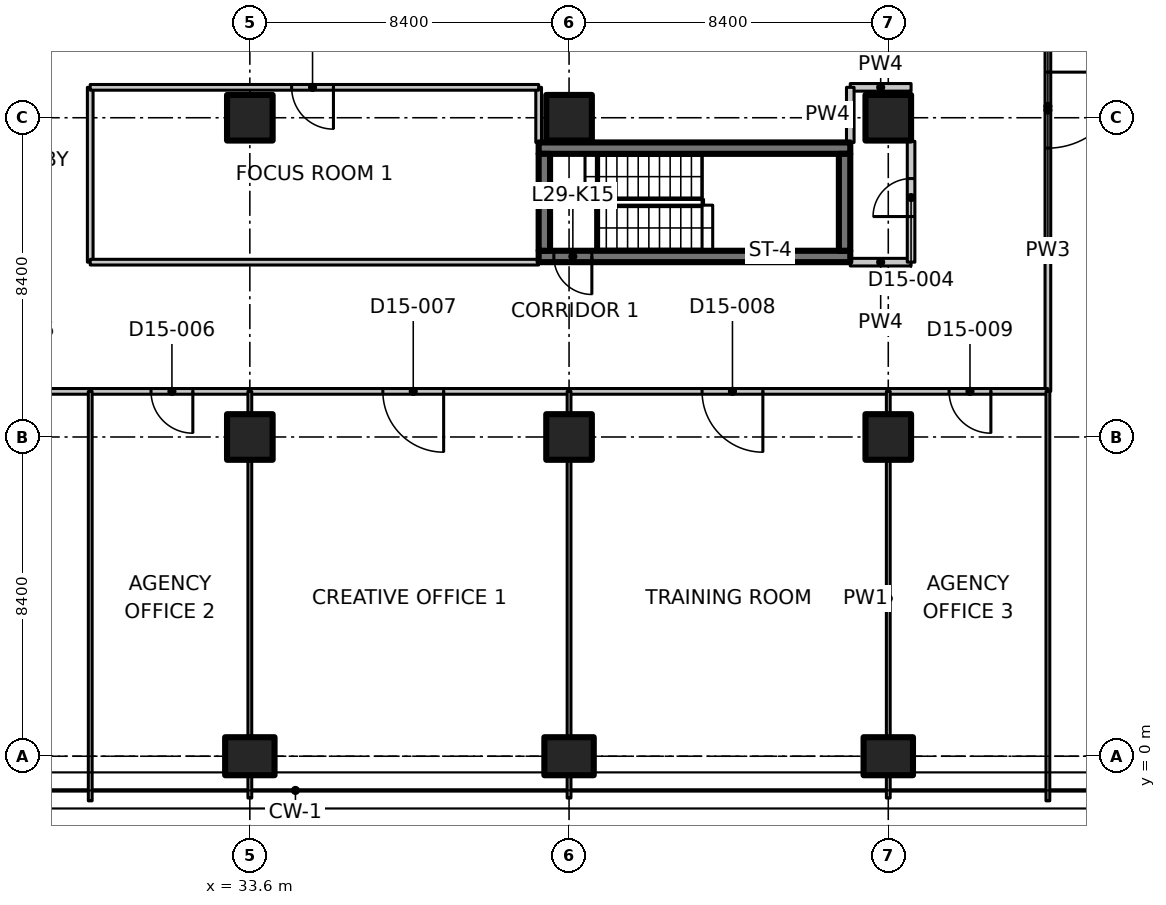
"""IFC4 building model, lengths in metres.
Left out: names, types, materials, properties, quantities, classifications, styles, units other than length and angle.
Written with IfcOpenShell. Run it as: python <this file> out.ifc"""

import sys

from ifc_helpers import new_model, si_unit, direction, frame, frame_2d, origin, origin_2d, place, context, subcontext, project, spatial, polyline, rectangle, outline, extrude, element, fill, save


model = new_model("IFC4")
c1 = context("Model", 3, precision=1e-05, world=origin(), true_north=direction((0.0, 1.0)))
c2 = subcontext(c1, "Body", "Model", "MODEL_VIEW")
j1 = project(units=[si_unit("LENGTHUNIT", "METRE"), si_unit("PLANEANGLEUNIT", "RADIAN")], contexts=[c1])
p1 = place(None, origin())
s1 = spatial("IfcSite", under=j1, at=p1, CompositionType="ELEMENT")
p2 = place(p1, origin())
s2 = spatial("IfcBuilding", under=s1, at=p2, CompositionType="ELEMENT")
p3 = place(p2, frame((0.0, 0.0, 120.5)))
s3 = spatial("IfcBuildingStorey", under=s2, at=p3, CompositionType="ELEMENT", Elevation=120.5)
p4 = place(p3, frame((33.6, 0.0, 0.0), z_axis=(0.0, 0.0, 1.0), x_axis=(0.0, 1.0, 0.0)))
e1 = element("IfcColumn", 1, at=p4, inside=s3, PredefinedType="COLUMN", context=c2, shape_type="SweptSolid", body=[
    extrude(rectangle(XDim=1.0, YDim=1.3, at=origin_2d()), origin(), (0.0, 0.0, 1.0), 3.35),
])
for number, where, z_axis, x_axis in (
    (2, (33.6, 8.4, 0.0), (0.0, 0.0, 1.0), (1.0, 0.0, 0.0)),
    (3, (33.6, 16.8, 0.0), (0.0, 0.0, 1.0), (1.0, 0.0, 0.0)),
):
    element("IfcColumn", number, at=place(p3, frame(where, z_axis=z_axis, x_axis=x_axis)), inside=s3, PredefinedType="COLUMN", context=c2, shape_type="SweptSolid", body=[
        extrude(rectangle(XDim=1.2, YDim=1.2, at=origin_2d()), origin(), (0.0, 0.0, 1.0), 3.35),
    ])
p5 = place(p3, frame((42.0, 0.0, 0.0), z_axis=(0.0, 0.0, 1.0), x_axis=(0.0, 1.0, 0.0)))
e4 = element("IfcColumn", 4, at=p5, inside=s3, PredefinedType="COLUMN", context=c2, shape_type="SweptSolid", body=[
    extrude(rectangle(XDim=1.0, YDim=1.3, at=origin_2d()), origin(), (0.0, 0.0, 1.0), 3.35),
])
for number, where, z_axis, x_axis in (
    (5, (42.0, 8.4, 0.0), (0.0, 0.0, 1.0), (1.0, 0.0, 0.0)),
    (6, (42.0, 16.8, 0.0), (0.0, 0.0, 1.0), (1.0, 0.0, 0.0)),
):
    element("IfcColumn", number, at=place(p3, frame(where, z_axis=z_axis, x_axis=x_axis)), inside=s3, PredefinedType="COLUMN", context=c2, shape_type="SweptSolid", body=[
        extrude(rectangle(XDim=1.2, YDim=1.2, at=origin_2d()), origin(), (0.0, 0.0, 1.0), 3.35),
    ])
p6 = place(p3, frame((50.4, 0.0, 0.0), z_axis=(0.0, 0.0, 1.0), x_axis=(0.0, 1.0, 0.0)))
e7 = element("IfcColumn", 7, at=p6, inside=s3, PredefinedType="COLUMN", context=c2, shape_type="SweptSolid", body=[
    extrude(rectangle(XDim=1.0, YDim=1.3, at=origin_2d()), origin(), (0.0, 0.0, 1.0), 3.35),
])
for number, where, z_axis, x_axis in (
    (8, (50.4, 8.4, 0.0), (0.0, 0.0, 1.0), (1.0, 0.0, 0.0)),
    (9, (50.4, 16.8, 0.0), (0.0, 0.0, 1.0), (1.0, 0.0, 0.0)),
):
    element("IfcColumn", number, at=place(p3, frame(where, z_axis=z_axis, x_axis=x_axis)), inside=s3, PredefinedType="COLUMN", context=c2, shape_type="SweptSolid", body=[
        extrude(rectangle(XDim=1.2, YDim=1.2, at=origin_2d()), origin(), (0.0, 0.0, 1.0), 3.35),
    ])
p7 = place(p3, frame((49.4, 13.15, 0.0), z_axis=(0.0, 0.0, 1.0), x_axis=(-1.0, 0.0, 0.0)))
e10 = element("IfcWall", 10, at=p7, inside=s3, PredefinedType="SHEAR", context=c2, shape_type="SweptSolid", body=[
    extrude(rectangle(XDim=8.2, YDim=0.3, at=frame_2d((4.1, 0.0))), origin(), (0.0, 0.0, 1.0), 3.35),
])
p8 = place(p7, frame((6.8, 0.0, 0.0)))
e11 = element("IfcOpeningElement", 11, at=p8, cuts=e10, PredefinedType="OPENING", context=c2, shape_type="SweptSolid", body=[
    extrude(rectangle(XDim=1.0, YDim=2.1, at=frame_2d((0.5, 1.05))), frame((0.0, 0.16, 0.0), z_axis=(0.0, -1.0, 0.0), x_axis=(1.0, 0.0, 0.0)), (0.0, 0.0, 1.0), 0.32),
])
p9 = place(p3, frame((41.2, 16.0, 0.0), z_axis=(0.0, 0.0, 1.0), x_axis=(1.0, 0.0, 0.0)))
e12 = element("IfcWall", 12, at=p9, inside=s3, PredefinedType="SHEAR", context=c2, shape_type="SweptSolid", body=[
    extrude(rectangle(XDim=8.2, YDim=0.3, at=frame_2d((4.1, 0.0))), origin(), (0.0, 0.0, 1.0), 3.35),
])
for number, where, z_axis, x_axis in (
    (13, (41.35, 13.3, 0.0), (0.0, 0.0, 1.0), (0.0, 1.0, 0.0)),
    (14, (49.25, 13.3, 0.0), (0.0, 0.0, 1.0), (0.0, 1.0, 0.0)),
):
    element("IfcWall", number, at=place(p3, frame(where, z_axis=z_axis, x_axis=x_axis)), inside=s3, PredefinedType="SHEAR", context=c2, shape_type="SweptSolid", body=[
        extrude(rectangle(XDim=2.55, YDim=0.3, at=frame_2d((1.275, 0.0))), origin(), (0.0, 0.0, 1.0), 3.35),
    ])
p10 = place(p3, frame((29.4, 17.6, 0.0), z_axis=(0.0, 0.0, 1.0), x_axis=(0.0, -1.0, 0.0)))
e15 = element("IfcWall", 15, at=p10, inside=s3, PredefinedType="PARTITIONING", context=c2, shape_type="SweptSolid", body=[
    extrude(rectangle(XDim=4.6, YDim=0.15, at=frame_2d((2.3, 0.0))), origin(), (0.0, 0.0, 1.0), 3.33),
])
p11 = place(p3, frame((29.4, 9.6, 0.0), z_axis=(0.0, 0.0, 1.0), x_axis=(-1.0, 0.0, 0.0)))
e16 = element("IfcWall", 16, at=p11, inside=s3, PredefinedType="PARTITIONING", context=c2, shape_type="SweptSolid", body=[
    extrude(rectangle(XDim=4.2, YDim=0.15, at=frame_2d((2.1, 0.0))), origin(), (0.0, 0.0, 1.0), 3.33),
])
p12 = place(p11, frame((1.5, 0.0, 0.0)))
e17 = element("IfcOpeningElement", 17, at=p12, cuts=e16, PredefinedType="OPENING", context=c2, shape_type="SweptSolid", body=[
    extrude(rectangle(XDim=1.1, YDim=2.1, at=frame_2d((0.55, 1.05))), frame((0.0, 0.085, 0.0), z_axis=(0.0, -1.0, 0.0), x_axis=(1.0, 0.0, 0.0)), (0.0, 0.0, 1.0), 0.17),
])
p13 = place(p3, frame((54.6, 13.0, 0.0), z_axis=(0.0, 0.0, 1.0), x_axis=(0.0, -1.0, 0.0)))
e18 = element("IfcWall", 18, at=p13, inside=s3, PredefinedType="PARTITIONING", context=c2, shape_type="SweptSolid", body=[
    extrude(rectangle(XDim=3.4, YDim=0.15, at=frame_2d((1.7, 0.0))), origin(), (0.0, 0.0, 1.0), 3.33),
])
p14 = place(p3, frame((29.4, 13.0, 0.0), z_axis=(0.0, 0.0, 1.0), x_axis=(1.0, 0.0, 0.0)))
e19 = element("IfcWall", 19, at=p14, inside=s3, PredefinedType="PARTITIONING", context=c2, shape_type="SweptSolid", body=[
    extrude(rectangle(XDim=11.8, YDim=0.15, at=frame_2d((5.9, 0.0))), origin(), (0.0, 0.0, 1.0), 3.33),
])
p15 = place(p3, frame((49.4, 13.0, 0.0), z_axis=(0.0, 0.0, 1.0), x_axis=(1.0, 0.0, 0.0)))
e20 = element("IfcWall", 20, at=p15, inside=s3, PredefinedType="PARTITIONING", context=c2, shape_type="SweptSolid", body=[
    extrude(rectangle(XDim=1.6, YDim=0.2, at=frame_2d((0.8, 0.0))), origin(), (0.0, 0.0, 1.0), 3.33),
])
p16 = place(p3, frame((33.6, 9.6, 0.0), z_axis=(0.0, 0.0, 1.0), x_axis=(-1.0, 0.0, 0.0)))
e21 = element("IfcWall", 21, at=p16, inside=s3, PredefinedType="PARTITIONING", context=c2, shape_type="SweptSolid", body=[
    extrude(rectangle(XDim=4.2, YDim=0.15, at=frame_2d((2.1, 0.0))), origin(), (0.0, 0.0, 1.0), 3.33),
])
p17 = place(p16, frame((1.5, 0.0, 0.0)))
e22 = element("IfcOpeningElement", 22, at=p17, cuts=e21, PredefinedType="OPENING", context=c2, shape_type="SweptSolid", body=[
    extrude(rectangle(XDim=1.1, YDim=2.1, at=frame_2d((0.55, 1.05))), frame((0.0, 0.085, 0.0), z_axis=(0.0, -1.0, 0.0), x_axis=(1.0, 0.0, 0.0)), (0.0, 0.0, 1.0), 0.17),
])
p18 = place(p3, frame((42.0, 9.6, 0.0), z_axis=(0.0, 0.0, 1.0), x_axis=(-1.0, 0.0, 0.0)))
e23 = element("IfcWall", 23, at=p18, inside=s3, PredefinedType="PARTITIONING", context=c2, shape_type="SweptSolid", body=[
    extrude(rectangle(XDim=8.4, YDim=0.15, at=frame_2d((4.2, 0.0))), origin(), (0.0, 0.0, 1.0), 3.33),
])
p19 = place(p18, frame((3.3, 0.0, 0.0)))
e24 = element("IfcOpeningElement", 24, at=p19, cuts=e23, PredefinedType="OPENING", context=c2, shape_type="SweptSolid", body=[
    extrude(rectangle(XDim=1.6, YDim=2.1, at=frame_2d((0.8, 1.05))), frame((0.0, 0.085, 0.0), z_axis=(0.0, -1.0, 0.0), x_axis=(1.0, 0.0, 0.0)), (0.0, 0.0, 1.0), 0.17),
])
p20 = place(p3, frame((50.4, 9.6, 0.0), z_axis=(0.0, 0.0, 1.0), x_axis=(-1.0, 0.0, 0.0)))
e25 = element("IfcWall", 25, at=p20, inside=s3, PredefinedType="PARTITIONING", context=c2, shape_type="SweptSolid", body=[
    extrude(rectangle(XDim=8.4, YDim=0.15, at=frame_2d((4.2, 0.0))), origin(), (0.0, 0.0, 1.0), 3.33),
])
p21 = place(p20, frame((3.3, 0.0, 0.0)))
e26 = element("IfcOpeningElement", 26, at=p21, cuts=e25, PredefinedType="OPENING", context=c2, shape_type="SweptSolid", body=[
    extrude(rectangle(XDim=1.6, YDim=2.1, at=frame_2d((0.8, 1.05))), frame((0.0, 0.085, 0.0), z_axis=(0.0, -1.0, 0.0), x_axis=(1.0, 0.0, 0.0)), (0.0, 0.0, 1.0), 0.17),
])
p22 = place(p3, frame((54.6, 9.6, 0.0), z_axis=(0.0, 0.0, 1.0), x_axis=(-1.0, 0.0, 0.0)))
e27 = element("IfcWall", 27, at=p22, inside=s3, PredefinedType="PARTITIONING", context=c2, shape_type="SweptSolid", body=[
    extrude(rectangle(XDim=4.2, YDim=0.15, at=frame_2d((2.1, 0.0))), origin(), (0.0, 0.0, 1.0), 3.33),
])
p23 = place(p22, frame((1.5, 0.0, 0.0)))
e28 = element("IfcOpeningElement", 28, at=p23, cuts=e27, PredefinedType="OPENING", context=c2, shape_type="SweptSolid", body=[
    extrude(rectangle(XDim=1.1, YDim=2.1, at=frame_2d((0.55, 1.05))), frame((0.0, 0.085, 0.0), z_axis=(0.0, -1.0, 0.0), x_axis=(1.0, 0.0, 0.0)), (0.0, 0.0, 1.0), 0.17),
])
p24 = place(p3, frame((54.6, 21.2, 0.0), z_axis=(0.0, 0.0, 1.0), x_axis=(0.0, -1.0, 0.0)))
e29 = element("IfcWall", 29, at=p24, inside=s3, PredefinedType="PARTITIONING", context=c2, shape_type="SweptSolid", body=[
    extrude(rectangle(XDim=8.2, YDim=0.15, at=frame_2d((4.1, 0.0))), origin(), (0.0, 0.0, 1.0), 3.33),
])
p25 = place(p24, frame((3.2, 0.0, 0.0)))
e30 = element("IfcOpeningElement", 30, at=p25, cuts=e29, PredefinedType="OPENING", context=c2, shape_type="SweptSolid", body=[
    extrude(rectangle(XDim=2.0, YDim=2.4, at=frame_2d((1.0, 1.2))), frame((0.0, 0.085, 0.0), z_axis=(0.0, -1.0, 0.0), x_axis=(1.0, 0.0, 0.0)), (0.0, 0.0, 1.0), 0.17),
])
p26 = place(p3, frame((54.6, -1.174, 0.0), z_axis=(0.0, 0.0, 1.0), x_axis=(0.0, 1.0, 0.0)))
e31 = element("IfcWall", 31, at=p26, inside=s3, PredefinedType="PARTITIONING", context=c2, shape_type="SweptSolid", body=[
    extrude(outline(polyline([(0.0, 0.0), (10.774, 0.0), (10.774, 3.33), (1.624, 3.33), (1.622, 2.98), (0.726, 2.98), (0.724, 3.33), (0.074, 3.33), (0.0, 3.33), (0.0, 0.0)])), frame((0.0, 0.05, 0.0), z_axis=(0.0, -1.0, 0.0), x_axis=(1.0, 0.0, 0.0)), (0.0, 0.0, 1.0), 0.1),
])
p27 = place(p3, frame((41.2, 16.15, 0.0), z_axis=(0.0, 0.0, 1.0), x_axis=(0.0, 1.0, 0.0)))
e32 = element("IfcWall", 32, at=p27, inside=s3, PredefinedType="PARTITIONING", context=c2, shape_type="SweptSolid", body=[
    extrude(rectangle(XDim=1.45, YDim=0.15, at=frame_2d((0.725, 0.0))), origin(), (0.0, 0.0, 1.0), 3.33),
])
p28 = place(p3, frame((41.2, 17.6, 0.0), z_axis=(0.0, 0.0, 1.0), x_axis=(-1.0, 0.0, 0.0)))
e33 = element("IfcWall", 33, at=p28, inside=s3, PredefinedType="PARTITIONING", context=c2, shape_type="SweptSolid", body=[
    extrude(rectangle(XDim=11.8, YDim=0.15, at=frame_2d((5.9, 0.0))), origin(), (0.0, 0.0, 1.0), 3.33),
])
p29 = place(p28, frame((5.4, 0.0, 0.0)))
e34 = element("IfcOpeningElement", 34, at=p29, cuts=e33, PredefinedType="OPENING", context=c2, shape_type="SweptSolid", body=[
    extrude(rectangle(XDim=1.1, YDim=2.1, at=frame_2d((0.55, 1.05))), frame((0.0, 0.085, 0.0), z_axis=(0.0, -1.0, 0.0), x_axis=(1.0, 0.0, 0.0)), (0.0, 0.0, 1.0), 0.17),
])
p30 = place(p3, frame((51.0, 17.6, 0.0), z_axis=(0.0, 0.0, 1.0), x_axis=(-1.0, 0.0, 0.0)))
e35 = element("IfcWall", 35, at=p30, inside=s3, PredefinedType="PARTITIONING", context=c2, shape_type="SweptSolid", body=[
    extrude(rectangle(XDim=1.6, YDim=0.2, at=frame_2d((0.8, 0.0))), origin(), (0.0, 0.0, 1.0), 3.33),
])
p31 = place(p3, frame((49.4, 17.6, 0.0), z_axis=(0.0, 0.0, 1.0), x_axis=(0.0, -1.0, 0.0)))
e36 = element("IfcWall", 36, at=p31, inside=s3, PredefinedType="PARTITIONING", context=c2, shape_type="SweptSolid", body=[
    extrude(rectangle(XDim=1.45, YDim=0.2, at=frame_2d((0.725, 0.0))), origin(), (0.0, 0.0, 1.0), 3.33),
])
p32 = place(p3, frame((51.0, 13.0, 0.0), z_axis=(0.0, 0.0, 1.0), x_axis=(0.0, 1.0, 0.0)))
e37 = element("IfcWall", 37, at=p32, inside=s3, PredefinedType="PARTITIONING", context=c2, shape_type="SweptSolid", body=[
    extrude(rectangle(XDim=3.18, YDim=0.2, at=frame_2d((1.59, 0.0))), origin(), (0.0, 0.0, 1.0), 3.33),
])
p33 = place(p32, frame((1.2, 0.0, 0.0)))
e38 = element("IfcOpeningElement", 38, at=p33, cuts=e37, PredefinedType="OPENING", context=c2, shape_type="SweptSolid", body=[
    extrude(rectangle(XDim=1.0, YDim=2.1, at=frame_2d((0.5, 1.05))), frame((0.0, 0.11, 0.0), z_axis=(0.0, -1.0, 0.0), x_axis=(1.0, 0.0, 0.0)), (0.0, 0.0, 1.0), 0.22),
])
p34 = place(p3, frame((29.4, 9.6, 0.0), z_axis=(0.0, 0.0, 1.0), x_axis=(0.0, -1.0, 0.0)))
e39 = element("IfcWall", 39, at=p34, inside=s3, PredefinedType="PARTITIONING", context=c2, shape_type="SweptSolid", body=[
    extrude(outline(polyline([(0.0, 0.0), (10.774, 0.0), (10.774, 3.33), (10.7, 3.33), (10.05, 3.33), (10.048, 2.98), (9.152, 2.98), (9.15, 3.33), (0.0, 3.33), (0.0, 0.0)])), frame((0.0, 0.05, 0.0), z_axis=(0.0, -1.0, 0.0), x_axis=(1.0, 0.0, 0.0)), (0.0, 0.0, 1.0), 0.1),
])
p35 = place(p3, frame((33.6, 9.6, 0.0), z_axis=(0.0, 0.0, 1.0), x_axis=(0.0, -1.0, 0.0)))
e40 = element("IfcWall", 40, at=p35, inside=s3, PredefinedType="PARTITIONING", context=c2, shape_type="SweptSolid", body=[
    extrude(rectangle(XDim=0.58, YDim=0.1, at=frame_2d((0.29, 0.0))), origin(), (0.0, 0.0, 1.0), 3.33),
])
p36 = place(p3, frame((33.6, 7.78, 0.0), z_axis=(0.0, 0.0, 1.0), x_axis=(0.0, -1.0, 0.0)))
e41 = element("IfcWall", 41, at=p36, inside=s3, PredefinedType="PARTITIONING", context=c2, shape_type="SweptSolid", body=[
    extrude(rectangle(XDim=7.26, YDim=0.1, at=frame_2d((3.63, 0.0))), origin(), (0.0, 0.0, 1.0), 3.33),
])
for number, where, z_axis, x_axis in (
    (42, (33.6, -0.52, 0.0), (0.0, 0.0, 1.0), (0.0, -1.0, 0.0)),
    (43, (42.0, 9.6, 0.0), (0.0, 0.0, 1.0), (0.0, -1.0, 0.0)),
):
    element("IfcWall", number, at=place(p3, frame(where, z_axis=z_axis, x_axis=x_axis)), inside=s3, PredefinedType="PARTITIONING", context=c2, shape_type="SweptSolid", body=[
        extrude(rectangle(XDim=0.58, YDim=0.1, at=frame_2d((0.29, 0.0))), origin(), (0.0, 0.0, 1.0), 3.33),
    ])
p37 = place(p3, frame((42.0, 7.78, 0.0), z_axis=(0.0, 0.0, 1.0), x_axis=(0.0, -1.0, 0.0)))
e44 = element("IfcWall", 44, at=p37, inside=s3, PredefinedType="PARTITIONING", context=c2, shape_type="SweptSolid", body=[
    extrude(rectangle(XDim=7.26, YDim=0.1, at=frame_2d((3.63, 0.0))), origin(), (0.0, 0.0, 1.0), 3.33),
])
for number, where, z_axis, x_axis in (
    (45, (42.0, -0.52, 0.0), (0.0, 0.0, 1.0), (0.0, -1.0, 0.0)),
    (46, (50.4, 9.6, 0.0), (0.0, 0.0, 1.0), (0.0, -1.0, 0.0)),
):
    element("IfcWall", number, at=place(p3, frame(where, z_axis=z_axis, x_axis=x_axis)), inside=s3, PredefinedType="PARTITIONING", context=c2, shape_type="SweptSolid", body=[
        extrude(rectangle(XDim=0.58, YDim=0.1, at=frame_2d((0.29, 0.0))), origin(), (0.0, 0.0, 1.0), 3.33),
    ])
p38 = place(p3, frame((50.4, 7.78, 0.0), z_axis=(0.0, 0.0, 1.0), x_axis=(0.0, -1.0, 0.0)))
e47 = element("IfcWall", 47, at=p38, inside=s3, PredefinedType="PARTITIONING", context=c2, shape_type="SweptSolid", body=[
    extrude(rectangle(XDim=7.26, YDim=0.1, at=frame_2d((3.63, 0.0))), origin(), (0.0, 0.0, 1.0), 3.33),
])
p39 = place(p3, frame((50.4, -0.52, 0.0), z_axis=(0.0, 0.0, 1.0), x_axis=(0.0, -1.0, 0.0)))
e48 = element("IfcWall", 48, at=p39, inside=s3, PredefinedType="PARTITIONING", context=c2, shape_type="SweptSolid", body=[
    extrude(rectangle(XDim=0.58, YDim=0.1, at=frame_2d((0.29, 0.0))), origin(), (0.0, 0.0, 1.0), 3.33),
])
p40 = place(p8, origin())
e49 = element("IfcDoor", 49, at=p40, inside=s3, OperationType="SINGLE_SWING_RIGHT", PredefinedType="DOOR", context=c2, shape_type="SweptSolid", body=[
    extrude(rectangle(XDim=1.0, YDim=2.1, at=frame_2d((0.5, 1.05))), frame((0.0, 0.025, 0.0), z_axis=(0.0, -1.0, 0.0), x_axis=(1.0, 0.0, 0.0)), (0.0, 0.0, 1.0), 0.05),
])
fill(e11, e49)
p41 = place(p25, origin())
e50 = element("IfcDoor", 50, at=p41, inside=s3, OperationType="DOUBLE_DOOR_SINGLE_SWING", PredefinedType="DOOR", context=c2, shape_type="SweptSolid", body=[
    extrude(rectangle(XDim=2.0, YDim=2.4, at=frame_2d((1.0, 1.2))), frame((0.0, 0.025, 0.0), z_axis=(0.0, -1.0, 0.0), x_axis=(1.0, 0.0, 0.0)), (0.0, 0.0, 1.0), 0.05),
])
fill(e30, e50)
p42 = place(p29, origin())
e51 = element("IfcDoor", 51, at=p42, inside=s3, OperationType="SINGLE_SWING_LEFT", PredefinedType="DOOR", context=c2, shape_type="SweptSolid", body=[
    extrude(rectangle(XDim=1.1, YDim=2.1, at=frame_2d((0.55, 1.05))), frame((0.0, 0.025, 0.0), z_axis=(0.0, -1.0, 0.0), x_axis=(1.0, 0.0, 0.0)), (0.0, 0.0, 1.0), 0.05),
])
fill(e34, e51)
p43 = place(p33, origin())
e52 = element("IfcDoor", 52, at=p43, inside=s3, OperationType="SINGLE_SWING_LEFT", PredefinedType="DOOR", context=c2, shape_type="SweptSolid", body=[
    extrude(rectangle(XDim=1.0, YDim=2.1, at=frame_2d((0.5, 1.05))), frame((0.0, 0.025, 0.0), z_axis=(0.0, -1.0, 0.0), x_axis=(1.0, 0.0, 0.0)), (0.0, 0.0, 1.0), 0.05),
])
fill(e38, e52)
p44 = place(p17, origin())
e53 = element("IfcDoor", 53, at=p44, inside=s3, OperationType="SINGLE_SWING_LEFT", PredefinedType="DOOR", context=c2, shape_type="SweptSolid", body=[
    extrude(rectangle(XDim=1.1, YDim=2.1, at=frame_2d((0.55, 1.05))), frame((0.0, 0.025, 0.0), z_axis=(0.0, -1.0, 0.0), x_axis=(1.0, 0.0, 0.0)), (0.0, 0.0, 1.0), 0.05),
])
fill(e22, e53)
p45 = place(p19, origin())
e54 = element("IfcDoor", 54, at=p45, inside=s3, OperationType="DOUBLE_DOOR_SINGLE_SWING", PredefinedType="DOOR", context=c2, shape_type="SweptSolid", body=[
    extrude(rectangle(XDim=1.6, YDim=2.1, at=frame_2d((0.8, 1.05))), frame((0.0, 0.025, 0.0), z_axis=(0.0, -1.0, 0.0), x_axis=(1.0, 0.0, 0.0)), (0.0, 0.0, 1.0), 0.05),
])
fill(e24, e54)
p46 = place(p21, origin())
e55 = element("IfcDoor", 55, at=p46, inside=s3, OperationType="DOUBLE_DOOR_SINGLE_SWING", PredefinedType="DOOR", context=c2, shape_type="SweptSolid", body=[
    extrude(rectangle(XDim=1.6, YDim=2.1, at=frame_2d((0.8, 1.05))), frame((0.0, 0.025, 0.0), z_axis=(0.0, -1.0, 0.0), x_axis=(1.0, 0.0, 0.0)), (0.0, 0.0, 1.0), 0.05),
])
fill(e26, e55)
p47 = place(p23, origin())
e56 = element("IfcDoor", 56, at=p47, inside=s3, OperationType="SINGLE_SWING_LEFT", PredefinedType="DOOR", context=c2, shape_type="SweptSolid", body=[
    extrude(rectangle(XDim=1.1, YDim=2.1, at=frame_2d((0.55, 1.05))), frame((0.0, 0.025, 0.0), z_axis=(0.0, -1.0, 0.0), x_axis=(1.0, 0.0, 0.0)), (0.0, 0.0, 1.0), 0.05),
])
fill(e28, e56)
save(model, sys.argv[1])
